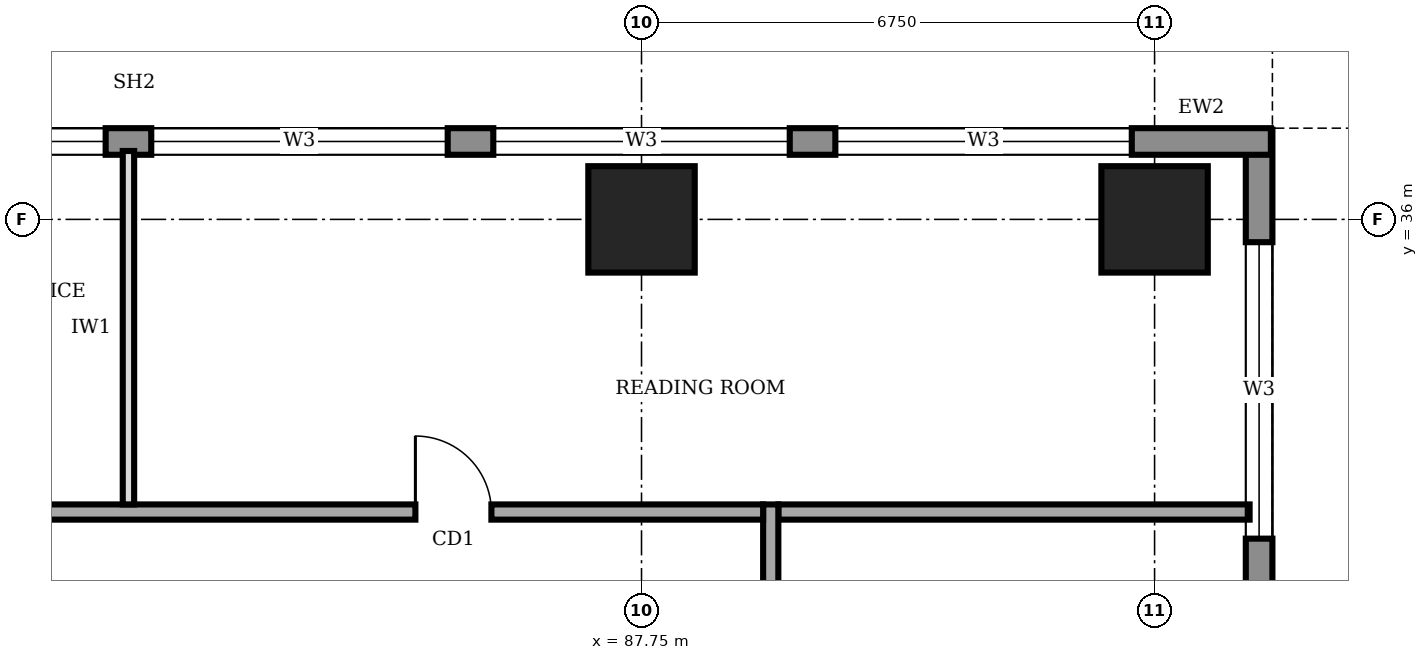
"""IFC4 building model, lengths in metres.
Left out: names, types, materials, properties, quantities, classifications, styles, units other than length and angle.
Written with IfcOpenShell. Run it as: python <this file> out.ifc"""

import sys

from ifc_helpers import new_model, si_unit, direction, frame, frame_2d, origin, origin_2d, place, context, subcontext, project, spatial, rectangle, extrude, element, fill, save


model = new_model("IFC4")
c1 = context("Model", 3, precision=1e-05, world=origin(), true_north=direction((0.0, 1.0)))
c2 = subcontext(c1, "Body", "Model", "MODEL_VIEW")
j1 = project(units=[si_unit("LENGTHUNIT", "METRE"), si_unit("PLANEANGLEUNIT", "RADIAN")], contexts=[c1])
p1 = place(None, origin())
s1 = spatial("IfcSite", under=j1, at=p1, CompositionType="ELEMENT")
p2 = place(p1, origin())
s2 = spatial("IfcBuilding", under=s1, at=p2, CompositionType="ELEMENT")
p3 = place(p2, frame((0.0, 0.0, 185.0)))
s3 = spatial("IfcBuildingStorey", under=s2, at=p3, CompositionType="ELEMENT", Elevation=185.0)
for number, where, z_axis, x_axis in (
    (1, (87.75, 36.0, 0.0), (0.0, 0.0, 1.0), (1.0, 0.0, 0.0)),
    (2, (94.5, 36.0, 0.0), (0.0, 0.0, 1.0), (1.0, 0.0, 0.0)),
):
    element("IfcColumn", number, at=place(p3, frame(where, z_axis=z_axis, x_axis=x_axis)), inside=s3, PredefinedType="COLUMN", context=c2, shape_type="SweptSolid", body=[
        extrude(rectangle(XDim=1.4, YDim=1.4, at=origin_2d()), origin(), (0.0, 0.0, 1.0), 4.0),
    ])
p4 = place(p3, frame((95.875, 3.32, 0.0), z_axis=(0.0, 0.0, 1.0), x_axis=(0.0, 1.0, 0.0)))
e3 = element("IfcWall", 3, at=p4, inside=s3, PredefinedType="STANDARD", context=c2, shape_type="SweptSolid", body=[
    extrude(rectangle(XDim=33.86, YDim=0.35, at=frame_2d((16.93, 0.0))), origin(), (0.0, 0.0, 1.0), 3.75),
])
p5 = place(p4, frame((1.48, 0.0, 0.95)))
e4 = element("IfcOpeningElement", 4, at=p5, cuts=e3, PredefinedType="OPENING", context=c2, shape_type="SweptSolid", body=[
    extrude(rectangle(XDim=3.9, YDim=1.8, at=frame_2d((1.95, 0.9))), frame((0.0, 0.185, 0.0), z_axis=(0.0, -1.0, 0.0), x_axis=(1.0, 0.0, 0.0)), (0.0, 0.0, 1.0), 0.37),
])
p6 = place(p4, frame((5.98, 0.0, 0.95)))
e5 = element("IfcOpeningElement", 5, at=p6, cuts=e3, PredefinedType="OPENING", context=c2, shape_type="SweptSolid", body=[
    extrude(rectangle(XDim=3.9, YDim=1.8, at=frame_2d((1.95, 0.9))), frame((0.0, 0.185, 0.0), z_axis=(0.0, -1.0, 0.0), x_axis=(1.0, 0.0, 0.0)), (0.0, 0.0, 1.0), 0.37),
])
p7 = place(p4, frame((10.48, 0.0, 0.95)))
e6 = element("IfcOpeningElement", 6, at=p7, cuts=e3, PredefinedType="OPENING", context=c2, shape_type="SweptSolid", body=[
    extrude(rectangle(XDim=3.9, YDim=1.8, at=frame_2d((1.95, 0.9))), frame((0.0, 0.185, 0.0), z_axis=(0.0, -1.0, 0.0), x_axis=(1.0, 0.0, 0.0)), (0.0, 0.0, 1.0), 0.37),
])
p8 = place(p4, frame((14.98, 0.0, 0.95)))
e7 = element("IfcOpeningElement", 7, at=p8, cuts=e3, PredefinedType="OPENING", context=c2, shape_type="SweptSolid", body=[
    extrude(rectangle(XDim=3.9, YDim=1.8, at=frame_2d((1.95, 0.9))), frame((0.0, 0.185, 0.0), z_axis=(0.0, -1.0, 0.0), x_axis=(1.0, 0.0, 0.0)), (0.0, 0.0, 1.0), 0.37),
])
p9 = place(p4, frame((19.48, 0.0, 0.95)))
e8 = element("IfcOpeningElement", 8, at=p9, cuts=e3, PredefinedType="OPENING", context=c2, shape_type="SweptSolid", body=[
    extrude(rectangle(XDim=3.9, YDim=1.8, at=frame_2d((1.95, 0.9))), frame((0.0, 0.185, 0.0), z_axis=(0.0, -1.0, 0.0), x_axis=(1.0, 0.0, 0.0)), (0.0, 0.0, 1.0), 0.37),
])
p10 = place(p4, frame((23.98, 0.0, 0.95)))
e9 = element("IfcOpeningElement", 9, at=p10, cuts=e3, PredefinedType="OPENING", context=c2, shape_type="SweptSolid", body=[
    extrude(rectangle(XDim=3.9, YDim=1.8, at=frame_2d((1.95, 0.9))), frame((0.0, 0.185, 0.0), z_axis=(0.0, -1.0, 0.0), x_axis=(1.0, 0.0, 0.0)), (0.0, 0.0, 1.0), 0.37),
])
p11 = place(p4, frame((28.48, 0.0, 0.95)))
e10 = element("IfcOpeningElement", 10, at=p11, cuts=e3, PredefinedType="OPENING", context=c2, shape_type="SweptSolid", body=[
    extrude(rectangle(XDim=3.9, YDim=1.8, at=frame_2d((1.95, 0.9))), frame((0.0, 0.185, 0.0), z_axis=(0.0, -1.0, 0.0), x_axis=(1.0, 0.0, 0.0)), (0.0, 0.0, 1.0), 0.37),
])
p12 = place(p3, frame((96.03, 37.025, 0.0), z_axis=(0.0, 0.0, 1.0), x_axis=(-1.0, 0.0, 0.0)))
e11 = element("IfcWall", 11, at=p12, inside=s3, PredefinedType="STANDARD", context=c2, shape_type="SweptSolid", body=[
    extrude(rectangle(XDim=29.91, YDim=0.35, at=frame_2d((14.955, 0.0))), origin(), (0.0, 0.0, 1.0), 3.75),
])
p13 = place(p12, frame((24.33, 0.0, 0.95)))
e12 = element("IfcOpeningElement", 12, at=p13, cuts=e11, PredefinedType="OPENING", context=c2, shape_type="SweptSolid", body=[
    extrude(rectangle(XDim=3.9, YDim=1.8, at=frame_2d((1.95, 0.9))), frame((0.0, 0.185, 0.0), z_axis=(0.0, -1.0, 0.0), x_axis=(1.0, 0.0, 0.0)), (0.0, 0.0, 1.0), 0.37),
])
p14 = place(p12, frame((19.83, 0.0, 0.95)))
e13 = element("IfcOpeningElement", 13, at=p14, cuts=e11, PredefinedType="OPENING", context=c2, shape_type="SweptSolid", body=[
    extrude(rectangle(XDim=3.9, YDim=1.8, at=frame_2d((1.95, 0.9))), frame((0.0, 0.185, 0.0), z_axis=(0.0, -1.0, 0.0), x_axis=(1.0, 0.0, 0.0)), (0.0, 0.0, 1.0), 0.37),
])
p15 = place(p12, frame((15.33, 0.0, 0.95)))
e14 = element("IfcOpeningElement", 14, at=p15, cuts=e11, PredefinedType="OPENING", context=c2, shape_type="SweptSolid", body=[
    extrude(rectangle(XDim=3.9, YDim=1.8, at=frame_2d((1.95, 0.9))), frame((0.0, 0.185, 0.0), z_axis=(0.0, -1.0, 0.0), x_axis=(1.0, 0.0, 0.0)), (0.0, 0.0, 1.0), 0.37),
])
p16 = place(p12, frame((10.83, 0.0, 0.95)))
e15 = element("IfcOpeningElement", 15, at=p16, cuts=e11, PredefinedType="OPENING", context=c2, shape_type="SweptSolid", body=[
    extrude(rectangle(XDim=3.9, YDim=1.8, at=frame_2d((1.95, 0.9))), frame((0.0, 0.185, 0.0), z_axis=(0.0, -1.0, 0.0), x_axis=(1.0, 0.0, 0.0)), (0.0, 0.0, 1.0), 0.37),
])
p17 = place(p12, frame((6.33, 0.0, 0.95)))
e16 = element("IfcOpeningElement", 16, at=p17, cuts=e11, PredefinedType="OPENING", context=c2, shape_type="SweptSolid", body=[
    extrude(rectangle(XDim=3.9, YDim=1.8, at=frame_2d((1.95, 0.9))), frame((0.0, 0.185, 0.0), z_axis=(0.0, -1.0, 0.0), x_axis=(1.0, 0.0, 0.0)), (0.0, 0.0, 1.0), 0.37),
])
p18 = place(p12, frame((1.83, 0.0, 0.95)))
e17 = element("IfcOpeningElement", 17, at=p18, cuts=e11, PredefinedType="OPENING", context=c2, shape_type="SweptSolid", body=[
    extrude(rectangle(XDim=3.9, YDim=1.8, at=frame_2d((1.95, 0.9))), frame((0.0, 0.185, 0.0), z_axis=(0.0, -1.0, 0.0), x_axis=(1.0, 0.0, 0.0)), (0.0, 0.0, 1.0), 0.37),
])
p19 = place(p3, frame((89.45, 9.2, 0.0), z_axis=(0.0, 0.0, 1.0), x_axis=(0.0, 1.0, 0.0)))
e18 = element("IfcWall", 18, at=p19, inside=s3, PredefinedType="SOLIDWALL", context=c2, shape_type="SweptSolid", body=[
    extrude(rectangle(XDim=23.05, YDim=0.2, at=frame_2d((11.525, 0.0))), origin(), (0.0, 0.0, 1.0), 3.75),
])
p20 = place(p19, frame((1.55, 0.0, 0.0)))
e19 = element("IfcOpeningElement", 19, at=p20, cuts=e18, PredefinedType="OPENING", context=c2, shape_type="SweptSolid", body=[
    extrude(rectangle(XDim=1.0, YDim=2.1, at=frame_2d((0.5, 1.05))), frame((0.0, 0.11, 0.0), z_axis=(0.0, -1.0, 0.0), x_axis=(1.0, 0.0, 0.0)), (0.0, 0.0, 1.0), 0.22),
])
p21 = place(p19, frame((4.9, 0.0, 0.0)))
e20 = element("IfcOpeningElement", 20, at=p21, cuts=e18, PredefinedType="OPENING", context=c2, shape_type="SweptSolid", body=[
    extrude(rectangle(XDim=1.0, YDim=2.1, at=frame_2d((0.5, 1.05))), frame((0.0, 0.11, 0.0), z_axis=(0.0, -1.0, 0.0), x_axis=(1.0, 0.0, 0.0)), (0.0, 0.0, 1.0), 0.22),
])
p22 = place(p19, frame((8.0, 0.0, 0.0)))
e21 = element("IfcOpeningElement", 21, at=p22, cuts=e18, PredefinedType="OPENING", context=c2, shape_type="SweptSolid", body=[
    extrude(rectangle(XDim=0.9, YDim=2.1, at=frame_2d((0.45, 1.05))), frame((0.0, 0.11, 0.0), z_axis=(0.0, -1.0, 0.0), x_axis=(1.0, 0.0, 0.0)), (0.0, 0.0, 1.0), 0.22),
])
p23 = place(p19, frame((11.05, 0.0, 0.0)))
e22 = element("IfcOpeningElement", 22, at=p23, cuts=e18, PredefinedType="OPENING", context=c2, shape_type="SweptSolid", body=[
    extrude(rectangle(XDim=0.9, YDim=2.1, at=frame_2d((0.45, 1.05))), frame((0.0, 0.11, 0.0), z_axis=(0.0, -1.0, 0.0), x_axis=(1.0, 0.0, 0.0)), (0.0, 0.0, 1.0), 0.22),
])
p24 = place(p19, frame((15.75, 0.0, 0.0)))
e23 = element("IfcOpeningElement", 23, at=p24, cuts=e18, PredefinedType="OPENING", context=c2, shape_type="SweptSolid", body=[
    extrude(rectangle(XDim=0.9, YDim=2.1, at=frame_2d((0.45, 1.05))), frame((0.0, 0.11, 0.0), z_axis=(0.0, -1.0, 0.0), x_axis=(1.0, 0.0, 0.0)), (0.0, 0.0, 1.0), 0.22),
])
p25 = place(p19, frame((13.1, 0.0, 0.0)))
e24 = element("IfcOpeningElement", 24, at=p25, cuts=e18, PredefinedType="OPENING", context=c2, shape_type="SweptSolid", body=[
    extrude(rectangle(XDim=1.0, YDim=2.1, at=frame_2d((0.5, 1.05))), frame((0.0, 0.11, 0.0), z_axis=(0.0, -1.0, 0.0), x_axis=(1.0, 0.0, 0.0)), (0.0, 0.0, 1.0), 0.22),
])
p26 = place(p19, frame((19.925, 0.0, 0.0)))
e25 = element("IfcOpeningElement", 25, at=p26, cuts=e18, PredefinedType="OPENING", context=c2, shape_type="SweptSolid", body=[
    extrude(rectangle(XDim=1.0, YDim=2.1, at=frame_2d((0.5, 1.05))), frame((0.0, 0.11, 0.0), z_axis=(0.0, -1.0, 0.0), x_axis=(1.0, 0.0, 0.0)), (0.0, 0.0, 1.0), 0.22),
])
p27 = place(p3, frame((89.35, 32.15, 0.0), z_axis=(0.0, 0.0, 1.0), x_axis=(-1.0, 0.0, 0.0)))
e26 = element("IfcWall", 26, at=p27, inside=s3, PredefinedType="SOLIDWALL", context=c2, shape_type="SweptSolid", body=[
    extrude(rectangle(XDim=16.9, YDim=0.2, at=frame_2d((8.45, 0.0))), origin(), (0.0, 0.0, 1.0), 3.75),
])
p28 = place(p27, frame((3.575, 0.0, 0.0)))
e27 = element("IfcOpeningElement", 27, at=p28, cuts=e26, PredefinedType="OPENING", context=c2, shape_type="SweptSolid", body=[
    extrude(rectangle(XDim=1.0, YDim=2.1, at=frame_2d((0.5, 1.05))), frame((0.0, 0.11, 0.0), z_axis=(0.0, -1.0, 0.0), x_axis=(1.0, 0.0, 0.0)), (0.0, 0.0, 1.0), 0.22),
])
p29 = place(p3, frame((89.55, 32.15, 0.0), z_axis=(0.0, 0.0, 1.0), x_axis=(1.0, 0.0, 0.0)))
e28 = element("IfcWall", 28, at=p29, inside=s3, PredefinedType="SOLIDWALL", context=c2, shape_type="SweptSolid", body=[
    extrude(rectangle(XDim=6.2, YDim=0.2, at=frame_2d((3.1, 0.0))), origin(), (0.0, 0.0, 1.0), 3.75),
])
p30 = place(p3, frame((81.0, 32.25, 0.0), z_axis=(0.0, 0.0, 1.0), x_axis=(0.0, 1.0, 0.0)))
e29 = element("IfcWall", 29, at=p30, inside=s3, PredefinedType="PARTITIONING", context=c2, shape_type="SweptSolid", body=[
    extrude(rectangle(XDim=4.65, YDim=0.15, at=frame_2d((2.325, 0.0))), origin(), (0.0, 0.0, 1.0), 3.75),
])
p31 = place(p11, origin())
e30 = element("IfcWindow", 30, at=p31, inside=s3, PartitioningType="SINGLE_PANEL", PredefinedType="WINDOW", context=c2, shape_type="SweptSolid", body=[
    extrude(rectangle(XDim=3.9, YDim=1.8, at=frame_2d((1.95, 0.9))), frame((0.0, 0.03, 0.0), z_axis=(0.0, -1.0, 0.0), x_axis=(1.0, 0.0, 0.0)), (0.0, 0.0, 1.0), 0.06),
])
fill(e10, e30)
p32 = place(p15, origin())
e31 = element("IfcWindow", 31, at=p32, inside=s3, PartitioningType="SINGLE_PANEL", PredefinedType="WINDOW", context=c2, shape_type="SweptSolid", body=[
    extrude(rectangle(XDim=3.9, YDim=1.8, at=frame_2d((1.95, 0.9))), frame((0.0, 0.03, 0.0), z_axis=(0.0, -1.0, 0.0), x_axis=(1.0, 0.0, 0.0)), (0.0, 0.0, 1.0), 0.06),
])
fill(e14, e31)
p33 = place(p16, origin())
e32 = element("IfcWindow", 32, at=p33, inside=s3, PartitioningType="SINGLE_PANEL", PredefinedType="WINDOW", context=c2, shape_type="SweptSolid", body=[
    extrude(rectangle(XDim=3.9, YDim=1.8, at=frame_2d((1.95, 0.9))), frame((0.0, 0.03, 0.0), z_axis=(0.0, -1.0, 0.0), x_axis=(1.0, 0.0, 0.0)), (0.0, 0.0, 1.0), 0.06),
])
fill(e15, e32)
p34 = place(p17, origin())
e33 = element("IfcWindow", 33, at=p34, inside=s3, PartitioningType="SINGLE_PANEL", PredefinedType="WINDOW", context=c2, shape_type="SweptSolid", body=[
    extrude(rectangle(XDim=3.9, YDim=1.8, at=frame_2d((1.95, 0.9))), frame((0.0, 0.03, 0.0), z_axis=(0.0, -1.0, 0.0), x_axis=(1.0, 0.0, 0.0)), (0.0, 0.0, 1.0), 0.06),
])
fill(e16, e33)
p35 = place(p18, origin())
e34 = element("IfcWindow", 34, at=p35, inside=s3, PartitioningType="SINGLE_PANEL", PredefinedType="WINDOW", context=c2, shape_type="SweptSolid", body=[
    extrude(rectangle(XDim=3.9, YDim=1.8, at=frame_2d((1.95, 0.9))), frame((0.0, 0.03, 0.0), z_axis=(0.0, -1.0, 0.0), x_axis=(1.0, 0.0, 0.0)), (0.0, 0.0, 1.0), 0.06),
])
fill(e17, e34)
p36 = place(p28, frame((1.0, 0.0, 0.0), z_axis=(0.0, 0.0, 1.0), x_axis=(-1.0, 0.0, 0.0)))
e35 = element("IfcDoor", 35, at=p36, inside=s3, OperationType="SINGLE_SWING_LEFT", PredefinedType="DOOR", context=c2, shape_type="SweptSolid", body=[
    extrude(rectangle(XDim=1.0, YDim=2.1, at=frame_2d((0.5, 1.05))), frame((0.0, 0.025, 0.0), z_axis=(0.0, -1.0, 0.0), x_axis=(1.0, 0.0, 0.0)), (0.0, 0.0, 1.0), 0.05),
])
fill(e27, e35)
save(model, sys.argv[1])
